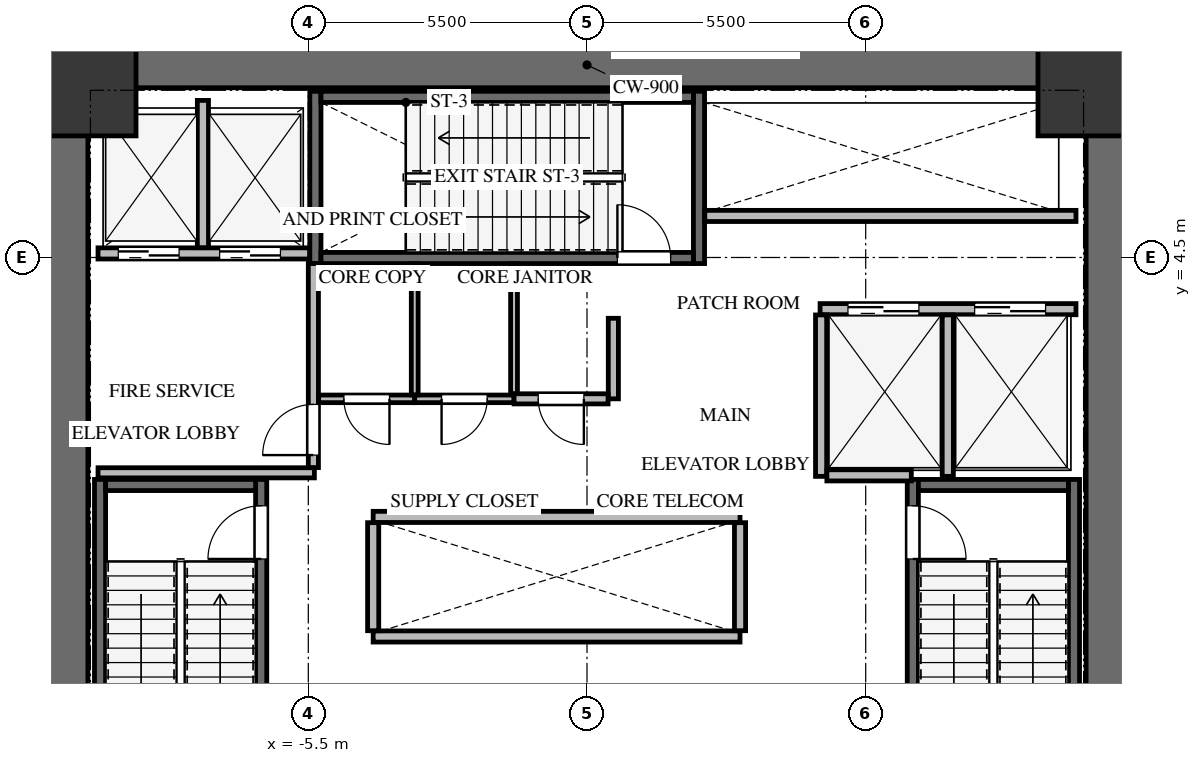
"""IFC4 building model, lengths in metres.
Left out: names, types, materials, properties, quantities, classifications, styles, units other than length and angle.
Written with IfcOpenShell. Run it as: python <this file> out.ifc"""

import sys

from ifc_helpers import new_model, si_unit, direction, frame, frame_2d, origin, origin_2d, place, context, subcontext, project, spatial, rectangle, extrude, source, transform, mapped, element, fill, save


model = new_model("IFC4")
c1 = context("Model", 3, precision=1e-05, world=origin(), true_north=direction((0.0, 1.0)))
c2 = subcontext(c1, "Body", "Model", "MODEL_VIEW")
j1 = project(units=[si_unit("LENGTHUNIT", "METRE"), si_unit("PLANEANGLEUNIT", "RADIAN")], contexts=[c1])
p1 = place(None, origin())
s1 = spatial("IfcSite", under=j1, at=p1, CompositionType="ELEMENT")
p2 = place(p1, origin())
s2 = spatial("IfcBuilding", under=s1, at=p2, CompositionType="ELEMENT")
p3 = place(p2, frame((0.0, 0.0, 21.2)))
s3 = spatial("IfcBuildingStorey", under=s2, at=p3, CompositionType="ELEMENT", Elevation=21.2)
for number, where, z_axis, x_axis in (
    (1, (-10.3, -8.75, 0.0), (0.0, 0.0, 1.0), (0.0, 1.0, 0.0)),
    (2, (10.3, -8.75, 0.0), (0.0, 0.0, 1.0), (0.0, 1.0, 0.0)),
):
    element("IfcWall", number, at=place(p3, frame(where, z_axis=z_axis, x_axis=x_axis)), inside=s3, PredefinedType="SHEAR", context=c2, shape_type="SweptSolid", body=[
        extrude(rectangle(XDim=17.5, YDim=0.9, at=frame_2d((8.75, 0.0))), origin(), (0.0, 0.0, 1.0), 5.6),
    ])
p4 = place(p3, frame((-9.85, 8.3, 0.0), z_axis=(0.0, 0.0, 1.0), x_axis=(1.0, 0.0, 0.0)))
e3 = element("IfcWall", 3, at=p4, inside=s3, PredefinedType="SHEAR", context=c2, shape_type="SweptSolid", body=[
    extrude(rectangle(XDim=19.7, YDim=0.9, at=frame_2d((9.85, 0.0))), origin(), (0.0, 0.0, 1.0), 5.6),
])
p5 = place(p3, frame((-6.43, -7.77, -0.32), z_axis=(0.0, 0.0, 1.0), x_axis=(0.0, 1.0, 0.0)))
e4 = element("IfcWall", 4, at=p5, inside=s3, PredefinedType="SHEAR", context=c2, shape_type="SweptSolid", body=[
    extrude(rectangle(XDim=7.89, YDim=0.22, at=frame_2d((3.945, 0.0))), origin(), (0.0, 0.0, 1.0), 5.6),
])
p6 = place(p5, frame((6.32, 0.0, 0.0)))
e5 = element("IfcOpeningElement", 5, at=p6, cuts=e4, PredefinedType="OPENING", context=c2, shape_type="SweptSolid", body=[
    extrude(rectangle(XDim=1.05, YDim=2.15, at=frame_2d((0.525, 1.075))), frame((0.0, 0.12, 0.0), z_axis=(0.0, -1.0, 0.0), x_axis=(1.0, 0.0, 0.0)), (0.0, 0.0, 1.0), 0.24),
])
p7 = place(p3, frame((-9.61, 0.12, -0.32), z_axis=(0.0, 0.0, 1.0), x_axis=(0.0, -1.0, 0.0)))
e6 = element("IfcWall", 6, at=p7, inside=s3, PredefinedType="SHEAR", context=c2, shape_type="SweptSolid", body=[
    extrude(rectangle(XDim=7.89, YDim=0.22, at=frame_2d((3.945, 0.0))), origin(), (0.0, 0.0, 1.0), 5.6),
])
p8 = place(p3, frame((-6.54, 0.01, -0.32), z_axis=(0.0, 0.0, 1.0), x_axis=(-1.0, 0.0, 0.0)))
e7 = element("IfcWall", 7, at=p8, inside=s3, PredefinedType="SHEAR", context=c2, shape_type="SweptSolid", body=[
    extrude(rectangle(XDim=2.96, YDim=0.22, at=frame_2d((1.48, 0.0))), origin(), (0.0, 0.0, 1.0), 5.6),
])
p9 = place(p3, frame((9.61, -7.77, -0.32), z_axis=(0.0, 0.0, 1.0), x_axis=(0.0, 1.0, 0.0)))
e8 = element("IfcWall", 8, at=p9, inside=s3, PredefinedType="SHEAR", context=c2, shape_type="SweptSolid", body=[
    extrude(rectangle(XDim=7.89, YDim=0.22, at=frame_2d((3.945, 0.0))), origin(), (0.0, 0.0, 1.0), 5.6),
])
p10 = place(p3, frame((6.43, 0.12, -0.32), z_axis=(0.0, 0.0, 1.0), x_axis=(0.0, -1.0, 0.0)))
e9 = element("IfcWall", 9, at=p10, inside=s3, PredefinedType="SHEAR", context=c2, shape_type="SweptSolid", body=[
    extrude(rectangle(XDim=7.89, YDim=0.22, at=frame_2d((3.945, 0.0))), origin(), (0.0, 0.0, 1.0), 5.6),
])
p11 = place(p10, frame((0.52, 0.0, 0.0)))
e10 = element("IfcOpeningElement", 10, at=p11, cuts=e9, PredefinedType="OPENING", context=c2, shape_type="SweptSolid", body=[
    extrude(rectangle(XDim=1.05, YDim=2.15, at=frame_2d((0.525, 1.075))), frame((0.0, 0.12, 0.0), z_axis=(0.0, -1.0, 0.0), x_axis=(1.0, 0.0, 0.0)), (0.0, 0.0, 1.0), 0.24),
])
p12 = place(p3, frame((9.5, 0.01, -0.32), z_axis=(0.0, 0.0, 1.0), x_axis=(-1.0, 0.0, 0.0)))
e11 = element("IfcWall", 11, at=p12, inside=s3, PredefinedType="SHEAR", context=c2, shape_type="SweptSolid", body=[
    extrude(rectangle(XDim=2.96, YDim=0.22, at=frame_2d((1.48, 0.0))), origin(), (0.0, 0.0, 1.0), 5.6),
])
for number, where, z_axis, x_axis in (
    (12, (2.21, 4.38, -0.32), (0.0, 0.0, 1.0), (0.0, 1.0, 0.0)),
    (13, (-5.36, 7.78, -0.32), (0.0, 0.0, 1.0), (0.0, -1.0, 0.0)),
):
    element("IfcWall", number, at=place(p3, frame(where, z_axis=z_axis, x_axis=x_axis)), inside=s3, PredefinedType="SHEAR", context=c2, shape_type="SweptSolid", body=[
        extrude(rectangle(XDim=3.4, YDim=0.22, at=frame_2d((1.7, 0.0))), origin(), (0.0, 0.0, 1.0), 5.6),
    ])
p13 = place(p3, frame((-5.25, 4.49, -0.32), z_axis=(0.0, 0.0, 1.0), x_axis=(1.0, 0.0, 0.0)))
e14 = element("IfcWall", 14, at=p13, inside=s3, PredefinedType="SHEAR", context=c2, shape_type="SweptSolid", body=[
    extrude(rectangle(XDim=7.35, YDim=0.22, at=frame_2d((3.675, 0.0))), origin(), (0.0, 0.0, 1.0), 5.6),
])
p14 = place(p13, frame((5.85, 0.0, 0.0)))
e15 = element("IfcOpeningElement", 15, at=p14, cuts=e14, PredefinedType="OPENING", context=c2, shape_type="SweptSolid", body=[
    extrude(rectangle(XDim=1.05, YDim=2.15, at=frame_2d((0.525, 1.075))), frame((0.0, 0.12, 0.0), z_axis=(0.0, -1.0, 0.0), x_axis=(1.0, 0.0, 0.0)), (0.0, 0.0, 1.0), 0.24),
])
p15 = place(p3, frame((2.1, 7.67, -0.32), z_axis=(0.0, 0.0, 1.0), x_axis=(-1.0, 0.0, 0.0)))
e16 = element("IfcWall", 16, at=p15, inside=s3, PredefinedType="SHEAR", context=c2, shape_type="SweptSolid", body=[
    extrude(rectangle(XDim=7.35, YDim=0.22, at=frame_2d((3.675, 0.0))), origin(), (0.0, 0.0, 1.0), 5.6),
])
m1 = source(origin(), c2, "Body", "SweptSolid", [
    extrude(rectangle(XDim=1.8, YDim=1.8, at=origin_2d()), origin(), (0.0, 0.0, 1.0), 5.6),
])
for number, where, z_axis, x_axis in (
    (17, (9.8, 7.8, -0.32), (0.0, 0.0, 1.0), (1.0, 0.0, 0.0)),
    (18, (-9.8, 7.8, -0.32), (0.0, 0.0, 1.0), (1.0, 0.0, 0.0)),
):
    element("IfcColumn", number, at=place(p3, frame(where, z_axis=z_axis, x_axis=x_axis)), inside=s3, PredefinedType="COLUMN", context=c2, shape_type="MappedRepresentation", body=[
        mapped(m1, transform((0.0, 0.0, 0.0), x_axis=(1.0, 0.0, 0.0), y_axis=(0.0, 1.0, 0.0), z_axis=(0.0, 0.0, 1.0), scale=1.0)),
    ])
p16 = place(p3, frame((-9.65, 4.58, 0.0), z_axis=(0.0, 0.0, 1.0), x_axis=(1.0, 0.0, 0.0)))
e19 = element("IfcWall", 19, at=p16, inside=s3, PredefinedType="SOLIDWALL", context=c2, shape_type="SweptSolid", body=[
    extrude(rectangle(XDim=4.175, YDim=0.22, at=frame_2d((2.087, 0.0))), origin(), (0.0, 0.0, 1.0), 5.265),
])
p17 = place(p16, frame((0.4, 0.0, 0.0)))
e20 = element("IfcOpeningElement", 20, at=p17, cuts=e19, PredefinedType="OPENING", context=c2, shape_type="SweptSolid", body=[
    extrude(rectangle(XDim=1.2, YDim=2.15, at=frame_2d((0.6, 1.075))), frame((0.0, 0.12, 0.0), z_axis=(0.0, -1.0, 0.0), x_axis=(1.0, 0.0, 0.0)), (0.0, 0.0, 1.0), 0.24),
])
p18 = place(p16, frame((2.4, 0.0, 0.0)))
e21 = element("IfcOpeningElement", 21, at=p18, cuts=e19, PredefinedType="OPENING", context=c2, shape_type="SweptSolid", body=[
    extrude(rectangle(XDim=1.2, YDim=2.15, at=frame_2d((0.6, 1.075))), frame((0.0, 0.12, 0.0), z_axis=(0.0, -1.0, 0.0), x_axis=(1.0, 0.0, 0.0)), (0.0, 0.0, 1.0), 0.24),
])
p19 = place(p3, frame((-7.58, 4.694, 0.0), z_axis=(0.0, 0.0, 1.0), x_axis=(0.0, 1.0, 0.0)))
e22 = element("IfcWall", 22, at=p19, inside=s3, PredefinedType="SOLIDWALL", context=c2, shape_type="SweptSolid", body=[
    extrude(rectangle(XDim=2.906, YDim=0.22, at=frame_2d((1.453, 0.0))), origin(), (0.0, 0.0, 1.0), 5.265),
])
p20 = place(p3, frame((-9.65, 0.25, 0.0), z_axis=(0.0, 0.0, 1.0), x_axis=(1.0, 0.0, 0.0)))
e23 = element("IfcWall", 23, at=p20, inside=s3, PredefinedType="SOLIDWALL", context=c2, shape_type="SweptSolid", body=[
    extrude(rectangle(XDim=4.27, YDim=0.2, at=frame_2d((2.135, 0.0))), origin(), (0.0, 0.0, 1.0), 5.265),
])
p21 = place(p3, frame((-5.4, 0.354, 0.0), z_axis=(0.0, 0.0, 1.0), x_axis=(0.0, 1.0, 0.0)))
e24 = element("IfcWall", 24, at=p21, inside=s3, PredefinedType="SOLIDWALL", context=c2, shape_type="SweptSolid", body=[
    extrude(rectangle(XDim=4.026, YDim=0.2, at=frame_2d((2.013, 0.0))), origin(), (0.0, 0.0, 1.0), 5.265),
])
p22 = place(p21, frame((0.246, 0.0, 0.0)))
e25 = element("IfcOpeningElement", 25, at=p22, cuts=e24, PredefinedType="OPENING", context=c2, shape_type="SweptSolid", body=[
    extrude(rectangle(XDim=1.0, YDim=2.15, at=frame_2d((0.5, 1.075))), frame((0.0, 0.11, 0.0), z_axis=(0.0, -1.0, 0.0), x_axis=(1.0, 0.0, 0.0)), (0.0, 0.0, 1.0), 0.22),
])
p23 = place(p3, frame((4.6, 3.48, 0.0), z_axis=(0.0, 0.0, 1.0), x_axis=(1.0, 0.0, 0.0)))
e26 = element("IfcWall", 26, at=p23, inside=s3, PredefinedType="SOLIDWALL", context=c2, shape_type="SweptSolid", body=[
    extrude(rectangle(XDim=5.05, YDim=0.22, at=frame_2d((2.525, 0.0))), origin(), (0.0, 0.0, 1.0), 5.265),
])
p24 = place(p23, frame((0.55, 0.0, 0.0)))
e27 = element("IfcOpeningElement", 27, at=p24, cuts=e26, PredefinedType="OPENING", context=c2, shape_type="SweptSolid", body=[
    extrude(rectangle(XDim=1.4, YDim=2.15, at=frame_2d((0.7, 1.075))), frame((0.0, 0.12, 0.0), z_axis=(0.0, -1.0, 0.0), x_axis=(1.0, 0.0, 0.0)), (0.0, 0.0, 1.0), 0.24),
])
p25 = place(p23, frame((3.05, 0.0, 0.0)))
e28 = element("IfcOpeningElement", 28, at=p25, cuts=e26, PredefinedType="OPENING", context=c2, shape_type="SweptSolid", body=[
    extrude(rectangle(XDim=1.4, YDim=2.15, at=frame_2d((0.7, 1.075))), frame((0.0, 0.12, 0.0), z_axis=(0.0, -1.0, 0.0), x_axis=(1.0, 0.0, 0.0)), (0.0, 0.0, 1.0), 0.24),
])
for number, where, z_axis, x_axis in (
    (29, (4.62, 0.18, 0.0), (0.0, 0.0, 1.0), (0.0, 1.0, 0.0)),
    (30, (7.12, 0.18, 0.0), (0.0, 0.0, 1.0), (0.0, 1.0, 0.0)),
):
    element("IfcWall", number, at=place(p3, frame(where, z_axis=z_axis, x_axis=x_axis)), inside=s3, PredefinedType="SOLIDWALL", context=c2, shape_type="SweptSolid", body=[
        extrude(rectangle(XDim=3.186, YDim=0.22, at=frame_2d((1.593, 0.0))), origin(), (0.0, 0.0, 1.0), 5.265),
    ])
p26 = place(p3, frame((4.734, 0.2, 0.0), z_axis=(0.0, 0.0, 1.0), x_axis=(1.0, 0.0, 0.0)))
e31 = element("IfcWall", 31, at=p26, inside=s3, PredefinedType="SOLIDWALL", context=c2, shape_type="SweptSolid", body=[
    extrude(rectangle(XDim=1.666, YDim=0.22, at=frame_2d((0.833, 0.0))), origin(), (0.0, 0.0, 1.0), 5.265),
])
for number, where, z_axis, x_axis in (
    (32, (-4.22, -2.98, 0.0), (0.0, 0.0, 1.0), (1.0, 0.0, 0.0)),
    (33, (-4.22, -0.62, 0.0), (0.0, 0.0, 1.0), (1.0, 0.0, 0.0)),
):
    element("IfcWall", number, at=place(p3, frame(where, z_axis=z_axis, x_axis=x_axis)), inside=s3, PredefinedType="SOLIDWALL", context=c2, shape_type="SweptSolid", body=[
        extrude(rectangle(XDim=7.24, YDim=0.22, at=frame_2d((3.62, 0.0))), origin(), (0.0, 0.0, 1.0), 5.265),
    ])
for number, where, z_axis, x_axis in (
    (34, (-4.22, -2.866, 0.0), (0.0, 0.0, 1.0), (0.0, 1.0, 0.0)),
    (35, (3.02, -2.866, 0.0), (0.0, 0.0, 1.0), (0.0, 1.0, 0.0)),
):
    element("IfcWall", number, at=place(p3, frame(where, z_axis=z_axis, x_axis=x_axis)), inside=s3, PredefinedType="SOLIDWALL", context=c2, shape_type="SweptSolid", body=[
        extrude(rectangle(XDim=2.132, YDim=0.22, at=frame_2d((1.066, 0.0))), origin(), (0.0, 0.0, 1.0), 5.265),
    ])
p27 = place(p3, frame((2.325, 5.32, 0.0), z_axis=(0.0, 0.0, 1.0), x_axis=(1.0, 0.0, 0.0)))
e36 = element("IfcWall", 36, at=p27, inside=s3, PredefinedType="SOLIDWALL", context=c2, shape_type="SweptSolid", body=[
    extrude(rectangle(XDim=7.325, YDim=0.22, at=frame_2d((3.663, 0.0))), origin(), (0.0, 0.0, 1.0), 5.265),
])
p28 = place(p3, frame((-3.4, 1.71, 0.0), z_axis=(0.0, 0.0, 1.0), x_axis=(-1.0, 0.0, 0.0)))
e37 = element("IfcWall", 37, at=p28, inside=s3, PredefinedType="PARTITIONING", context=c2, shape_type="SweptSolid", body=[
    extrude(rectangle(XDim=1.896, YDim=0.15, at=frame_2d((0.948, 0.0))), origin(), (0.0, 0.0, 1.0), 5.265),
])
p29 = place(p28, frame((0.498, 0.0, 0.0)))
e38 = element("IfcOpeningElement", 38, at=p29, cuts=e37, PredefinedType="OPENING", context=c2, shape_type="SweptSolid", body=[
    extrude(rectangle(XDim=0.9, YDim=2.05, at=frame_2d((0.45, 1.025))), frame((0.0, 0.085, 0.0), z_axis=(0.0, -1.0, 0.0), x_axis=(1.0, 0.0, 0.0)), (0.0, 0.0, 1.0), 0.17),
])
p30 = place(p3, frame((-1.44, 1.71, 0.0), z_axis=(0.0, 0.0, 1.0), x_axis=(-1.0, 0.0, 0.0)))
e39 = element("IfcWall", 39, at=p30, inside=s3, PredefinedType="PARTITIONING", context=c2, shape_type="SweptSolid", body=[
    extrude(rectangle(XDim=1.96, YDim=0.15, at=frame_2d((0.98, 0.0))), origin(), (0.0, 0.0, 1.0), 5.265),
])
p31 = place(p30, frame((0.53, 0.0, 0.0)))
e40 = element("IfcOpeningElement", 40, at=p31, cuts=e39, PredefinedType="OPENING", context=c2, shape_type="SweptSolid", body=[
    extrude(rectangle(XDim=0.9, YDim=2.05, at=frame_2d((0.45, 1.025))), frame((0.0, 0.085, 0.0), z_axis=(0.0, -1.0, 0.0), x_axis=(1.0, 0.0, 0.0)), (0.0, 0.0, 1.0), 0.17),
])
p32 = place(p3, frame((0.52, 3.3, 0.0), z_axis=(0.0, 0.0, 1.0), x_axis=(0.0, -1.0, 0.0)))
e41 = element("IfcWall", 41, at=p32, inside=s3, PredefinedType="SOLIDWALL", context=c2, shape_type="SweptSolid", body=[
    extrude(rectangle(XDim=1.59, YDim=0.2, at=frame_2d((0.795, 0.0))), origin(), (0.0, 0.0, 1.0), 5.265),
])
p33 = place(p3, frame((0.416, 1.71, 0.0), z_axis=(0.0, 0.0, 1.0), x_axis=(-1.0, 0.0, 0.0)))
e42 = element("IfcWall", 42, at=p33, inside=s3, PredefinedType="SOLIDWALL", context=c2, shape_type="SweptSolid", body=[
    extrude(rectangle(XDim=1.856, YDim=0.2, at=frame_2d((0.928, 0.0))), origin(), (0.0, 0.0, 1.0), 5.265),
])
p34 = place(p33, frame((0.478, 0.0, 0.0)))
e43 = element("IfcOpeningElement", 43, at=p34, cuts=e42, PredefinedType="OPENING", context=c2, shape_type="SweptSolid", body=[
    extrude(rectangle(XDim=0.9, YDim=2.05, at=frame_2d((0.45, 1.025))), frame((0.0, 0.11, 0.0), z_axis=(0.0, -1.0, 0.0), x_axis=(1.0, 0.0, 0.0)), (0.0, 0.0, 1.0), 0.22),
])
p35 = place(p3, frame((-3.4, 4.375, 0.0), z_axis=(0.0, 0.0, 1.0), x_axis=(0.0, -1.0, 0.0)))
e44 = element("IfcWall", 44, at=p35, inside=s3, PredefinedType="PARTITIONING", context=c2, shape_type="SweptSolid", body=[
    extrude(rectangle(XDim=2.586, YDim=0.135, at=frame_2d((1.293, 0.0))), origin(), (0.0, 0.0, 1.0), 5.265),
])
p36 = place(p3, frame((-1.44, 4.375, 0.0), z_axis=(0.0, 0.0, 1.0), x_axis=(0.0, -1.0, 0.0)))
e45 = element("IfcWall", 45, at=p36, inside=s3, PredefinedType="PARTITIONING", context=c2, shape_type="SweptSolid", body=[
    extrude(rectangle(XDim=2.561, YDim=0.135, at=frame_2d((1.281, 0.0))), origin(), (0.0, 0.0, 1.0), 5.265),
])
m2 = source(origin(), c2, "Body", "SweptSolid", [
    extrude(rectangle(XDim=1.05, YDim=2.15, at=frame_2d((0.525, 1.075))), frame((0.0, 0.025, 0.0), z_axis=(0.0, -1.0, 0.0), x_axis=(1.0, 0.0, 0.0)), (0.0, 0.0, 1.0), 0.05),
])
p37 = place(p6, origin())
e46 = element("IfcDoor", 46, at=p37, inside=s3, OperationType="SINGLE_SWING_LEFT", PredefinedType="DOOR", context=c2, shape_type="MappedRepresentation", body=[
    mapped(m2, transform((0.0, 0.0, 0.0), x_axis=(1.0, 0.0, 0.0), y_axis=(0.0, 1.0, 0.0), z_axis=(0.0, 0.0, 1.0), scale=1.0)),
])
fill(e5, e46)
m3 = source(origin(), c2, "Body", "SweptSolid", [
    extrude(rectangle(XDim=1.05, YDim=2.15, at=frame_2d((0.525, 1.075))), frame((0.0, 0.025, 0.0), z_axis=(0.0, -1.0, 0.0), x_axis=(1.0, 0.0, 0.0)), (0.0, 0.0, 1.0), 0.05),
])
p38 = place(p11, origin())
e47 = element("IfcDoor", 47, at=p38, inside=s3, OperationType="SINGLE_SWING_RIGHT", PredefinedType="DOOR", context=c2, shape_type="MappedRepresentation", body=[
    mapped(m3, transform((0.0, 0.0, 0.0), x_axis=(1.0, 0.0, 0.0), y_axis=(0.0, 1.0, 0.0), z_axis=(0.0, 0.0, 1.0), scale=1.0)),
])
fill(e10, e47)
p39 = place(p14, origin())
e48 = element("IfcDoor", 48, at=p39, inside=s3, OperationType="SINGLE_SWING_LEFT", PredefinedType="DOOR", context=c2, shape_type="MappedRepresentation", body=[
    mapped(m2, transform((0.0, 0.0, 0.0), x_axis=(1.0, 0.0, 0.0), y_axis=(0.0, 1.0, 0.0), z_axis=(0.0, 0.0, 1.0), scale=1.0)),
])
fill(e15, e48)
m4 = source(origin(), c2, "Body", "SweptSolid", [
    extrude(rectangle(XDim=1.2, YDim=2.15, at=frame_2d((0.6, 1.075))), frame((0.0, 0.025, 0.0), z_axis=(0.0, -1.0, 0.0), x_axis=(1.0, 0.0, 0.0)), (0.0, 0.0, 1.0), 0.05),
])
p40 = place(p17, origin())
e49 = element("IfcDoor", 49, at=p40, inside=s3, OperationType="DOUBLE_DOOR_SLIDING", PredefinedType="DOOR", context=c2, shape_type="MappedRepresentation", body=[
    mapped(m4, transform((0.0, 0.0, 0.0), x_axis=(1.0, 0.0, 0.0), y_axis=(0.0, 1.0, 0.0), z_axis=(0.0, 0.0, 1.0), scale=1.0)),
])
fill(e20, e49)
p41 = place(p18, origin())
e50 = element("IfcDoor", 50, at=p41, inside=s3, OperationType="DOUBLE_DOOR_SLIDING", PredefinedType="DOOR", context=c2, shape_type="MappedRepresentation", body=[
    mapped(m4, transform((0.0, 0.0, 0.0), x_axis=(1.0, 0.0, 0.0), y_axis=(0.0, 1.0, 0.0), z_axis=(0.0, 0.0, 1.0), scale=1.0)),
])
fill(e21, e50)
m5 = source(origin(), c2, "Body", "SweptSolid", [
    extrude(rectangle(XDim=1.0, YDim=2.15, at=frame_2d((0.5, 1.075))), frame((0.0, 0.025, 0.0), z_axis=(0.0, -1.0, 0.0), x_axis=(1.0, 0.0, 0.0)), (0.0, 0.0, 1.0), 0.05),
])
p42 = place(p22, origin())
e51 = element("IfcDoor", 51, at=p42, inside=s3, OperationType="SINGLE_SWING_LEFT", PredefinedType="DOOR", context=c2, shape_type="MappedRepresentation", body=[
    mapped(m5, transform((0.0, 0.0, 0.0), x_axis=(1.0, 0.0, 0.0), y_axis=(0.0, 1.0, 0.0), z_axis=(0.0, 0.0, 1.0), scale=1.0)),
])
fill(e25, e51)
m6 = source(origin(), c2, "Body", "SweptSolid", [
    extrude(rectangle(XDim=1.4, YDim=2.15, at=frame_2d((0.7, 1.075))), frame((0.0, 0.025, 0.0), z_axis=(0.0, -1.0, 0.0), x_axis=(1.0, 0.0, 0.0)), (0.0, 0.0, 1.0), 0.05),
])
p43 = place(p24, origin())
e52 = element("IfcDoor", 52, at=p43, inside=s3, OperationType="DOUBLE_DOOR_SLIDING", PredefinedType="DOOR", context=c2, shape_type="MappedRepresentation", body=[
    mapped(m6, transform((0.0, 0.0, 0.0), x_axis=(1.0, 0.0, 0.0), y_axis=(0.0, 1.0, 0.0), z_axis=(0.0, 0.0, 1.0), scale=1.0)),
])
fill(e27, e52)
p44 = place(p25, origin())
e53 = element("IfcDoor", 53, at=p44, inside=s3, OperationType="DOUBLE_DOOR_SLIDING", PredefinedType="DOOR", context=c2, shape_type="MappedRepresentation", body=[
    mapped(m6, transform((0.0, 0.0, 0.0), x_axis=(1.0, 0.0, 0.0), y_axis=(0.0, 1.0, 0.0), z_axis=(0.0, 0.0, 1.0), scale=1.0)),
])
fill(e28, e53)
m7 = source(origin(), c2, "Body", "SweptSolid", [
    extrude(rectangle(XDim=0.9, YDim=2.05, at=frame_2d((0.45, 1.025))), frame((0.0, 0.025, 0.0), z_axis=(0.0, -1.0, 0.0), x_axis=(1.0, 0.0, 0.0)), (0.0, 0.0, 1.0), 0.05),
])
p45 = place(p29, origin())
e54 = element("IfcDoor", 54, at=p45, inside=s3, OperationType="SINGLE_SWING_LEFT", PredefinedType="DOOR", context=c2, shape_type="MappedRepresentation", body=[
    mapped(m7, transform((0.0, 0.0, 0.0), x_axis=(1.0, 0.0, 0.0), y_axis=(0.0, 1.0, 0.0), z_axis=(0.0, 0.0, 1.0), scale=1.0)),
])
fill(e38, e54)
m8 = source(origin(), c2, "Body", "SweptSolid", [
    extrude(rectangle(XDim=0.9, YDim=2.05, at=frame_2d((0.45, 1.025))), frame((0.0, 0.025, 0.0), z_axis=(0.0, -1.0, 0.0), x_axis=(1.0, 0.0, 0.0)), (0.0, 0.0, 1.0), 0.05),
])
p46 = place(p31, origin())
e55 = element("IfcDoor", 55, at=p46, inside=s3, OperationType="SINGLE_SWING_RIGHT", PredefinedType="DOOR", context=c2, shape_type="MappedRepresentation", body=[
    mapped(m8, transform((0.0, 0.0, 0.0), x_axis=(1.0, 0.0, 0.0), y_axis=(0.0, 1.0, 0.0), z_axis=(0.0, 0.0, 1.0), scale=1.0)),
])
fill(e40, e55)
p47 = place(p34, origin())
e56 = element("IfcDoor", 56, at=p47, inside=s3, OperationType="SINGLE_SWING_LEFT", PredefinedType="DOOR", context=c2, shape_type="MappedRepresentation", body=[
    mapped(m7, transform((0.0, 0.0, 0.0), x_axis=(1.0, 0.0, 0.0), y_axis=(0.0, 1.0, 0.0), z_axis=(0.0, 0.0, 1.0), scale=1.0)),
])
fill(e43, e56)
save(model, sys.argv[1])
